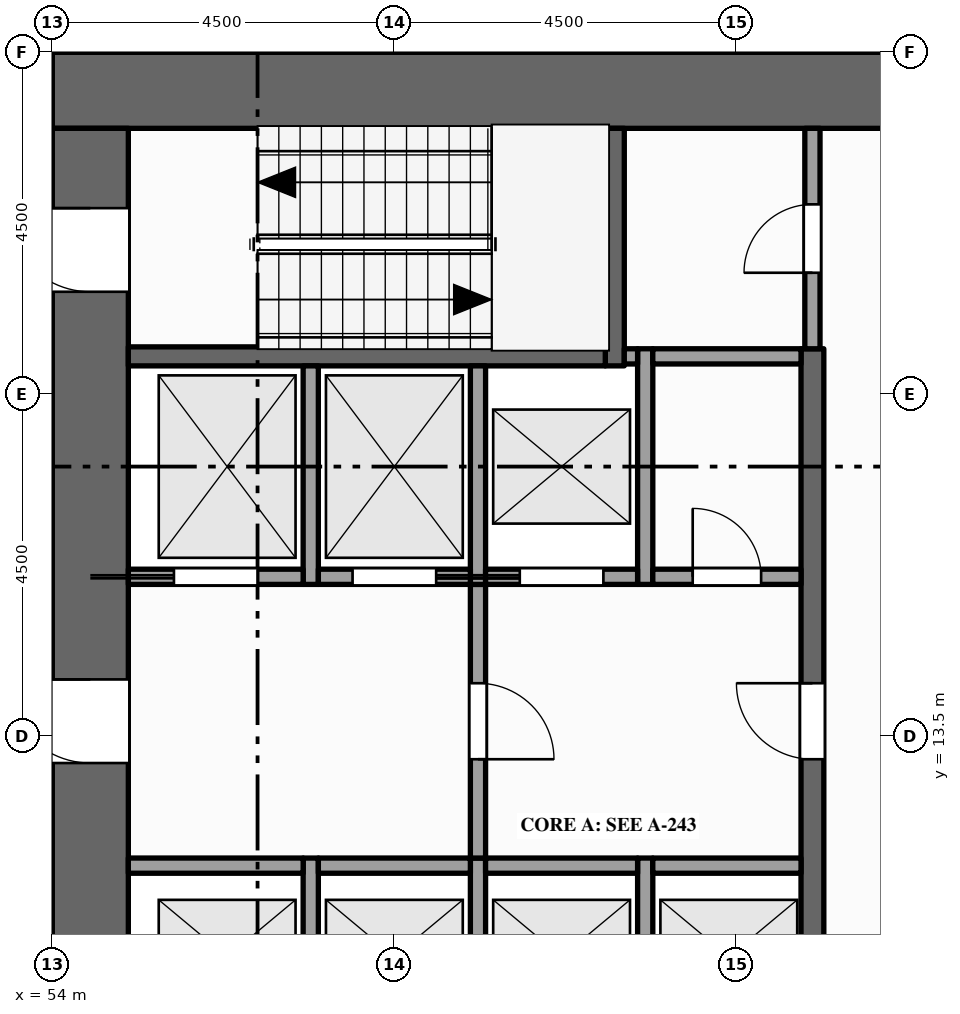
"""IFC4 building model, lengths in metres.
Left out: names, types, materials, properties, quantities, classifications, styles, units other than length and angle.
Written with IfcOpenShell. Run it as: python <this file> out.ifc"""

import sys

from ifc_helpers import new_model, si_unit, direction, frame, frame_2d, origin, place, context, subcontext, project, spatial, rectangle, extrude, element, fill, save


model = new_model("IFC4")
c1 = context("Model", 3, precision=1e-05, world=origin(), true_north=direction((0.0, 1.0)))
c2 = subcontext(c1, "Body", "Model", "MODEL_VIEW")
j1 = project(units=[si_unit("LENGTHUNIT", "METRE"), si_unit("PLANEANGLEUNIT", "RADIAN")], contexts=[c1])
p1 = place(None, origin())
s1 = spatial("IfcSite", under=j1, at=p1, CompositionType="ELEMENT")
p2 = place(p1, origin())
s2 = spatial("IfcBuilding", under=s1, at=p2, CompositionType="ELEMENT")
p3 = place(p2, frame((0.0, 0.0, 239.0)))
s3 = spatial("IfcBuildingStorey", under=s2, at=p3, CompositionType="ELEMENT", Elevation=239.0)
p4 = place(p3, frame((54.0, 22.0, -0.15), z_axis=(0.0, 0.0, 1.0), x_axis=(1.0, 0.0, 0.0)))
e1 = element("IfcWall", 1, at=p4, inside=s3, PredefinedType="SHEAR", context=c2, shape_type="SweptSolid", body=[
    extrude(rectangle(XDim=13.5, YDim=1.0, at=frame_2d((6.75, 0.0))), origin(), (0.0, 0.0, 1.0), 4.0),
])
p5 = place(p3, frame((54.5, 1.0, -0.15), z_axis=(0.0, 0.0, 1.0), x_axis=(0.0, 1.0, 0.0)))
e2 = element("IfcWall", 2, at=p5, inside=s3, PredefinedType="SHEAR", context=c2, shape_type="SweptSolid", body=[
    extrude(rectangle(XDim=20.5, YDim=1.0, at=frame_2d((10.25, 0.0))), origin(), (0.0, 0.0, 1.0), 4.0),
])
p6 = place(p5, frame((6.1, 0.0, 0.15)))
e3 = element("IfcOpeningElement", 3, at=p6, cuts=e2, PredefinedType="OPENING", context=c2, shape_type="SweptSolid", body=[
    extrude(rectangle(XDim=1.8, YDim=2.1, at=frame_2d((0.9, 1.05))), frame((0.0, 0.51, 0.0), z_axis=(0.0, -1.0, 0.0), x_axis=(1.0, 0.0, 0.0)), (0.0, 0.0, 1.0), 1.02),
])
p7 = place(p5, frame((12.15, 0.0, 0.15)))
e4 = element("IfcOpeningElement", 4, at=p7, cuts=e2, PredefinedType="OPENING", context=c2, shape_type="SweptSolid", body=[
    extrude(rectangle(XDim=1.1, YDim=2.1, at=frame_2d((0.55, 1.05))), frame((0.0, 0.51, 0.0), z_axis=(0.0, -1.0, 0.0), x_axis=(1.0, 0.0, 0.0)), (0.0, 0.0, 1.0), 1.02),
])
p8 = place(p5, frame((1.15, 0.0, 0.15)))
e5 = element("IfcOpeningElement", 5, at=p8, cuts=e2, PredefinedType="OPENING", context=c2, shape_type="SweptSolid", body=[
    extrude(rectangle(XDim=1.1, YDim=2.1, at=frame_2d((0.55, 1.05))), frame((0.0, 0.51, 0.0), z_axis=(0.0, -1.0, 0.0), x_axis=(1.0, 0.0, 0.0)), (0.0, 0.0, 1.0), 1.02),
])
p9 = place(p5, frame((18.35, 0.0, 0.15)))
e6 = element("IfcOpeningElement", 6, at=p9, cuts=e2, PredefinedType="OPENING", context=c2, shape_type="SweptSolid", body=[
    extrude(rectangle(XDim=1.1, YDim=2.1, at=frame_2d((0.55, 1.05))), frame((0.0, 0.51, 0.0), z_axis=(0.0, -1.0, 0.0), x_axis=(1.0, 0.0, 0.0)), (0.0, 0.0, 1.0), 1.02),
])
p10 = place(p3, frame((57.4, 9.3, 0.0), z_axis=(0.0, 0.0, 1.0), x_axis=(0.0, 1.0, 0.0)))
e7 = element("IfcWall", 7, at=p10, inside=s3, PredefinedType="SOLIDWALL", context=c2, shape_type="SweptSolid", body=[
    extrude(rectangle(XDim=2.6, YDim=0.2, at=frame_2d((1.3, 0.0))), origin(), (0.0, 0.0, 1.0), 3.75),
])
p11 = place(p3, frame((57.4, 15.5, 0.0), z_axis=(0.0, 0.0, 1.0), x_axis=(0.0, 1.0, 0.0)))
e8 = element("IfcWall", 8, at=p11, inside=s3, PredefinedType="SOLIDWALL", context=c2, shape_type="SweptSolid", body=[
    extrude(rectangle(XDim=2.875, YDim=0.2, at=frame_2d((1.438, 0.0))), origin(), (0.0, 0.0, 1.0), 3.75),
])
p12 = place(p3, frame((59.6, 9.3, 0.0), z_axis=(0.0, 0.0, 1.0), x_axis=(0.0, 1.0, 0.0)))
e9 = element("IfcWall", 9, at=p12, inside=s3, PredefinedType="SOLIDWALL", context=c2, shape_type="SweptSolid", body=[
    extrude(rectangle(XDim=2.6, YDim=0.2, at=frame_2d((1.3, 0.0))), origin(), (0.0, 0.0, 1.0), 3.75),
])
p13 = place(p3, frame((59.6, 11.9, 0.0), z_axis=(0.0, 0.0, 1.0), x_axis=(0.0, 1.0, 0.0)))
e10 = element("IfcWall", 10, at=p13, inside=s3, PredefinedType="PARTITIONING", context=c2, shape_type="SweptSolid", body=[
    extrude(rectangle(XDim=3.6, YDim=0.2, at=frame_2d((1.8, 0.0))), origin(), (0.0, 0.0, 1.0), 3.75),
])
p14 = place(p13, frame((1.3, 0.0, 0.0)))
e11 = element("IfcOpeningElement", 11, at=p14, cuts=e10, PredefinedType="OPENING", context=c2, shape_type="SweptSolid", body=[
    extrude(rectangle(XDim=1.0, YDim=2.1, at=frame_2d((0.5, 1.05))), frame((0.0, 0.11, 0.0), z_axis=(0.0, -1.0, 0.0), x_axis=(1.0, 0.0, 0.0)), (0.0, 0.0, 1.0), 0.22),
])
p15 = place(p3, frame((59.6, 15.5, 0.0), z_axis=(0.0, 0.0, 1.0), x_axis=(0.0, 1.0, 0.0)))
e12 = element("IfcWall", 12, at=p15, inside=s3, PredefinedType="SOLIDWALL", context=c2, shape_type="SweptSolid", body=[
    extrude(rectangle(XDim=2.875, YDim=0.2, at=frame_2d((1.438, 0.0))), origin(), (0.0, 0.0, 1.0), 3.75),
])
p16 = place(p3, frame((61.4, 18.375, 0.0), z_axis=(0.0, 0.0, 1.0), x_axis=(0.0, 1.0, 0.0)))
e13 = element("IfcWall", 13, at=p16, inside=s3, PredefinedType="SHEAR", context=c2, shape_type="SweptSolid", body=[
    extrude(rectangle(XDim=3.125, YDim=0.25, at=frame_2d((1.562, 0.0))), origin(), (0.0, 0.0, 1.0), 3.75),
])
p17 = place(p3, frame((61.8, 9.3, 0.0), z_axis=(0.0, 0.0, 1.0), x_axis=(0.0, 1.0, 0.0)))
e14 = element("IfcWall", 14, at=p17, inside=s3, PredefinedType="SOLIDWALL", context=c2, shape_type="SweptSolid", body=[
    extrude(rectangle(XDim=2.6, YDim=0.2, at=frame_2d((1.3, 0.0))), origin(), (0.0, 0.0, 1.0), 3.75),
])
p18 = place(p3, frame((61.8, 15.5, 0.0), z_axis=(0.0, 0.0, 1.0), x_axis=(0.0, 1.0, 0.0)))
e15 = element("IfcWall", 15, at=p18, inside=s3, PredefinedType="SOLIDWALL", context=c2, shape_type="SweptSolid", body=[
    extrude(rectangle(XDim=3.1, YDim=0.2, at=frame_2d((1.55, 0.0))), origin(), (0.0, 0.0, 1.0), 3.75),
])
p19 = place(p3, frame((64.0, 4.1, 0.0), z_axis=(0.0, 0.0, 1.0), x_axis=(0.0, 1.0, 0.0)))
e16 = element("IfcWall", 16, at=p19, inside=s3, PredefinedType="SHEAR", context=c2, shape_type="SweptSolid", body=[
    extrude(rectangle(XDim=14.5, YDim=0.3, at=frame_2d((7.25, 0.0))), origin(), (0.0, 0.0, 1.0), 3.75),
])
p20 = place(p19, frame((3.4, 0.0, 0.0)))
e17 = element("IfcOpeningElement", 17, at=p20, cuts=e16, PredefinedType="OPENING", context=c2, shape_type="SweptSolid", body=[
    extrude(rectangle(XDim=1.0, YDim=2.1, at=frame_2d((0.5, 1.05))), frame((0.0, 0.16, 0.0), z_axis=(0.0, -1.0, 0.0), x_axis=(1.0, 0.0, 0.0)), (0.0, 0.0, 1.0), 0.32),
])
p21 = place(p19, frame((9.1, 0.0, 0.0)))
e18 = element("IfcOpeningElement", 18, at=p21, cuts=e16, PredefinedType="OPENING", context=c2, shape_type="SweptSolid", body=[
    extrude(rectangle(XDim=1.0, YDim=2.1, at=frame_2d((0.5, 1.05))), frame((0.0, 0.16, 0.0), z_axis=(0.0, -1.0, 0.0), x_axis=(1.0, 0.0, 0.0)), (0.0, 0.0, 1.0), 0.32),
])
p22 = place(p3, frame((64.0, 18.6, 0.0), z_axis=(0.0, 0.0, 1.0), x_axis=(0.0, 1.0, 0.0)))
e19 = element("IfcWall", 19, at=p22, inside=s3, PredefinedType="PARTITIONING", context=c2, shape_type="SweptSolid", body=[
    extrude(rectangle(XDim=2.9, YDim=0.2, at=frame_2d((1.45, 0.0))), origin(), (0.0, 0.0, 1.0), 3.75),
])
p23 = place(p22, frame((1.0, 0.0, 0.0)))
e20 = element("IfcOpeningElement", 20, at=p23, cuts=e19, PredefinedType="OPENING", context=c2, shape_type="SweptSolid", body=[
    extrude(rectangle(XDim=0.9, YDim=2.1, at=frame_2d((0.45, 1.05))), frame((0.0, 0.11, 0.0), z_axis=(0.0, -1.0, 0.0), x_axis=(1.0, 0.0, 0.0)), (0.0, 0.0, 1.0), 0.22),
])
p24 = place(p3, frame((55.0, 11.8, 0.0), z_axis=(0.0, 0.0, 1.0), x_axis=(1.0, 0.0, 0.0)))
e21 = element("IfcWall", 21, at=p24, inside=s3, PredefinedType="SOLIDWALL", context=c2, shape_type="SweptSolid", body=[
    extrude(rectangle(XDim=2.3, YDim=0.2, at=frame_2d((1.15, 0.0))), origin(), (0.0, 0.0, 1.0), 3.75),
])
for number, where, z_axis, x_axis in (
    (22, (57.5, 11.8, 0.0), (0.0, 0.0, 1.0), (1.0, 0.0, 0.0)),
    (23, (59.7, 11.8, 0.0), (0.0, 0.0, 1.0), (1.0, 0.0, 0.0)),
):
    element("IfcWall", number, at=place(p3, frame(where, z_axis=z_axis, x_axis=x_axis)), inside=s3, PredefinedType="SOLIDWALL", context=c2, shape_type="SweptSolid", body=[
        extrude(rectangle(XDim=2.0, YDim=0.2, at=frame_2d((1.0, 0.0))), origin(), (0.0, 0.0, 1.0), 3.75),
    ])
p25 = place(p3, frame((61.9, 11.8, 0.0), z_axis=(0.0, 0.0, 1.0), x_axis=(1.0, 0.0, 0.0)))
e24 = element("IfcWall", 24, at=p25, inside=s3, PredefinedType="SOLIDWALL", context=c2, shape_type="SweptSolid", body=[
    extrude(rectangle(XDim=1.95, YDim=0.2, at=frame_2d((0.975, 0.0))), origin(), (0.0, 0.0, 1.0), 3.75),
])
p26 = place(p3, frame((55.0, 15.6, 0.0), z_axis=(0.0, 0.0, 1.0), x_axis=(1.0, 0.0, 0.0)))
e25 = element("IfcWall", 25, at=p26, inside=s3, PredefinedType="SOLIDWALL", context=c2, shape_type="SweptSolid", body=[
    extrude(rectangle(XDim=2.3, YDim=0.2, at=frame_2d((1.15, 0.0))), origin(), (0.0, 0.0, 1.0), 3.75),
])
p27 = place(p26, frame((0.6, 0.0, 0.012)))
e26 = element("IfcOpeningElement", 26, at=p27, cuts=e25, PredefinedType="OPENING", context=c2, shape_type="SweptSolid", body=[
    extrude(rectangle(XDim=1.1, YDim=2.1, at=frame_2d((0.55, 1.05))), frame((0.0, 0.11, 0.0), z_axis=(0.0, -1.0, 0.0), x_axis=(1.0, 0.0, 0.0)), (0.0, 0.0, 1.0), 0.22),
])
p28 = place(p3, frame((57.5, 15.6, 0.0), z_axis=(0.0, 0.0, 1.0), x_axis=(1.0, 0.0, 0.0)))
e27 = element("IfcWall", 27, at=p28, inside=s3, PredefinedType="SOLIDWALL", context=c2, shape_type="SweptSolid", body=[
    extrude(rectangle(XDim=2.0, YDim=0.2, at=frame_2d((1.0, 0.0))), origin(), (0.0, 0.0, 1.0), 3.75),
])
p29 = place(p28, frame((0.45, 0.0, 0.012)))
e28 = element("IfcOpeningElement", 28, at=p29, cuts=e27, PredefinedType="OPENING", context=c2, shape_type="SweptSolid", body=[
    extrude(rectangle(XDim=1.1, YDim=2.1, at=frame_2d((0.55, 1.05))), frame((0.0, 0.11, 0.0), z_axis=(0.0, -1.0, 0.0), x_axis=(1.0, 0.0, 0.0)), (0.0, 0.0, 1.0), 0.22),
])
p30 = place(p3, frame((59.7, 15.6, 0.0), z_axis=(0.0, 0.0, 1.0), x_axis=(1.0, 0.0, 0.0)))
e29 = element("IfcWall", 29, at=p30, inside=s3, PredefinedType="SOLIDWALL", context=c2, shape_type="SweptSolid", body=[
    extrude(rectangle(XDim=2.0, YDim=0.2, at=frame_2d((1.0, 0.0))), origin(), (0.0, 0.0, 1.0), 3.75),
])
p31 = place(p30, frame((0.45, 0.0, 0.012)))
e30 = element("IfcOpeningElement", 30, at=p31, cuts=e29, PredefinedType="OPENING", context=c2, shape_type="SweptSolid", body=[
    extrude(rectangle(XDim=1.1, YDim=2.1, at=frame_2d((0.55, 1.05))), frame((0.0, 0.11, 0.0), z_axis=(0.0, -1.0, 0.0), x_axis=(1.0, 0.0, 0.0)), (0.0, 0.0, 1.0), 0.22),
])
p32 = place(p3, frame((61.9, 15.6, 0.0), z_axis=(0.0, 0.0, 1.0), x_axis=(1.0, 0.0, 0.0)))
e31 = element("IfcWall", 31, at=p32, inside=s3, PredefinedType="PARTITIONING", context=c2, shape_type="SweptSolid", body=[
    extrude(rectangle(XDim=1.95, YDim=0.2, at=frame_2d((0.975, 0.0))), origin(), (0.0, 0.0, 1.0), 3.75),
])
p33 = place(p32, frame((0.525, 0.0, 0.0)))
e32 = element("IfcOpeningElement", 32, at=p33, cuts=e31, PredefinedType="OPENING", context=c2, shape_type="SweptSolid", body=[
    extrude(rectangle(XDim=0.9, YDim=2.1, at=frame_2d((0.45, 1.05))), frame((0.0, 0.11, 0.0), z_axis=(0.0, -1.0, 0.0), x_axis=(1.0, 0.0, 0.0)), (0.0, 0.0, 1.0), 0.22),
])
p34 = place(p3, frame((55.0, 18.5, 0.0), z_axis=(0.0, 0.0, 1.0), x_axis=(1.0, 0.0, 0.0)))
e33 = element("IfcWall", 33, at=p34, inside=s3, PredefinedType="SHEAR", context=c2, shape_type="SweptSolid", body=[
    extrude(rectangle(XDim=6.275, YDim=0.25, at=frame_2d((3.137, 0.0))), origin(), (0.0, 0.0, 1.0), 3.75),
])
p35 = place(p3, frame((61.525, 18.5, 0.0), z_axis=(0.0, 0.0, 1.0), x_axis=(1.0, 0.0, 0.0)))
e34 = element("IfcWall", 34, at=p35, inside=s3, PredefinedType="SOLIDWALL", context=c2, shape_type="SweptSolid", body=[
    extrude(rectangle(XDim=0.175, YDim=0.2, at=frame_2d((0.087, 0.0))), origin(), (0.0, 0.0, 1.0), 3.75),
])
p36 = place(p3, frame((61.9, 18.5, 0.0), z_axis=(0.0, 0.0, 1.0), x_axis=(1.0, 0.0, 0.0)))
e35 = element("IfcWall", 35, at=p36, inside=s3, PredefinedType="PARTITIONING", context=c2, shape_type="SweptSolid", body=[
    extrude(rectangle(XDim=1.95, YDim=0.2, at=frame_2d((0.975, 0.0))), origin(), (0.0, 0.0, 1.0), 3.75),
])
p37 = place(p27, origin())
e36 = element("IfcDoor", 36, at=p37, inside=s3, OperationType="SLIDING_TO_LEFT", PredefinedType="DOOR", context=c2, shape_type="SweptSolid", body=[
    extrude(rectangle(XDim=1.1, YDim=2.1, at=frame_2d((0.55, 1.05))), frame((0.0, 0.025, 0.0), z_axis=(0.0, -1.0, 0.0), x_axis=(1.0, 0.0, 0.0)), (0.0, 0.0, 1.0), 0.05),
])
fill(e26, e36)
p38 = place(p29, origin())
e37 = element("IfcDoor", 37, at=p38, inside=s3, OperationType="SLIDING_TO_RIGHT", PredefinedType="DOOR", context=c2, shape_type="SweptSolid", body=[
    extrude(rectangle(XDim=1.1, YDim=2.1, at=frame_2d((0.55, 1.05))), frame((0.0, 0.025, 0.0), z_axis=(0.0, -1.0, 0.0), x_axis=(1.0, 0.0, 0.0)), (0.0, 0.0, 1.0), 0.05),
])
fill(e28, e37)
p39 = place(p31, origin())
e38 = element("IfcDoor", 38, at=p39, inside=s3, OperationType="SLIDING_TO_LEFT", PredefinedType="DOOR", context=c2, shape_type="SweptSolid", body=[
    extrude(rectangle(XDim=1.1, YDim=2.1, at=frame_2d((0.55, 1.05))), frame((0.0, 0.025, 0.0), z_axis=(0.0, -1.0, 0.0), x_axis=(1.0, 0.0, 0.0)), (0.0, 0.0, 1.0), 0.05),
])
fill(e30, e38)
p40 = place(p7, origin())
e39 = element("IfcDoor", 39, at=p40, inside=s3, OperationType="SINGLE_SWING_RIGHT", PredefinedType="DOOR", context=c2, shape_type="SweptSolid", body=[
    extrude(rectangle(XDim=1.1, YDim=2.1, at=frame_2d((0.55, 1.05))), frame((0.0, 0.025, 0.0), z_axis=(0.0, -1.0, 0.0), x_axis=(1.0, 0.0, 0.0)), (0.0, 0.0, 1.0), 0.05),
])
fill(e4, e39)
p41 = place(p14, origin())
e40 = element("IfcDoor", 40, at=p41, inside=s3, OperationType="SINGLE_SWING_LEFT", PredefinedType="DOOR", context=c2, shape_type="SweptSolid", body=[
    extrude(rectangle(XDim=1.0, YDim=2.1, at=frame_2d((0.5, 1.05))), frame((0.0, 0.025, 0.0), z_axis=(0.0, -1.0, 0.0), x_axis=(1.0, 0.0, 0.0)), (0.0, 0.0, 1.0), 0.05),
])
fill(e11, e40)
p42 = place(p21, origin())
e41 = element("IfcDoor", 41, at=p42, inside=s3, OperationType="SINGLE_SWING_RIGHT", PredefinedType="DOOR", context=c2, shape_type="SweptSolid", body=[
    extrude(rectangle(XDim=1.0, YDim=2.1, at=frame_2d((0.5, 1.05))), frame((0.0, 0.025, 0.0), z_axis=(0.0, -1.0, 0.0), x_axis=(1.0, 0.0, 0.0)), (0.0, 0.0, 1.0), 0.05),
])
fill(e18, e41)
p43 = place(p9, origin())
e42 = element("IfcDoor", 42, at=p43, inside=s3, OperationType="SINGLE_SWING_RIGHT", PredefinedType="DOOR", context=c2, shape_type="SweptSolid", body=[
    extrude(rectangle(XDim=1.1, YDim=2.1, at=frame_2d((0.55, 1.05))), frame((0.0, 0.025, 0.0), z_axis=(0.0, -1.0, 0.0), x_axis=(1.0, 0.0, 0.0)), (0.0, 0.0, 1.0), 0.05),
])
fill(e6, e42)
p44 = place(p23, origin())
e43 = element("IfcDoor", 43, at=p44, inside=s3, OperationType="SINGLE_SWING_LEFT", PredefinedType="DOOR", context=c2, shape_type="SweptSolid", body=[
    extrude(rectangle(XDim=0.9, YDim=2.1, at=frame_2d((0.45, 1.05))), frame((0.0, 0.025, 0.0), z_axis=(0.0, -1.0, 0.0), x_axis=(1.0, 0.0, 0.0)), (0.0, 0.0, 1.0), 0.05),
])
fill(e20, e43)
p45 = place(p33, origin())
e44 = element("IfcDoor", 44, at=p45, inside=s3, OperationType="SINGLE_SWING_LEFT", PredefinedType="DOOR", context=c2, shape_type="SweptSolid", body=[
    extrude(rectangle(XDim=0.9, YDim=2.1, at=frame_2d((0.45, 1.05))), frame((0.0, 0.025, 0.0), z_axis=(0.0, -1.0, 0.0), x_axis=(1.0, 0.0, 0.0)), (0.0, 0.0, 1.0), 0.05),
])
fill(e32, e44)
save(model, sys.argv[1])
